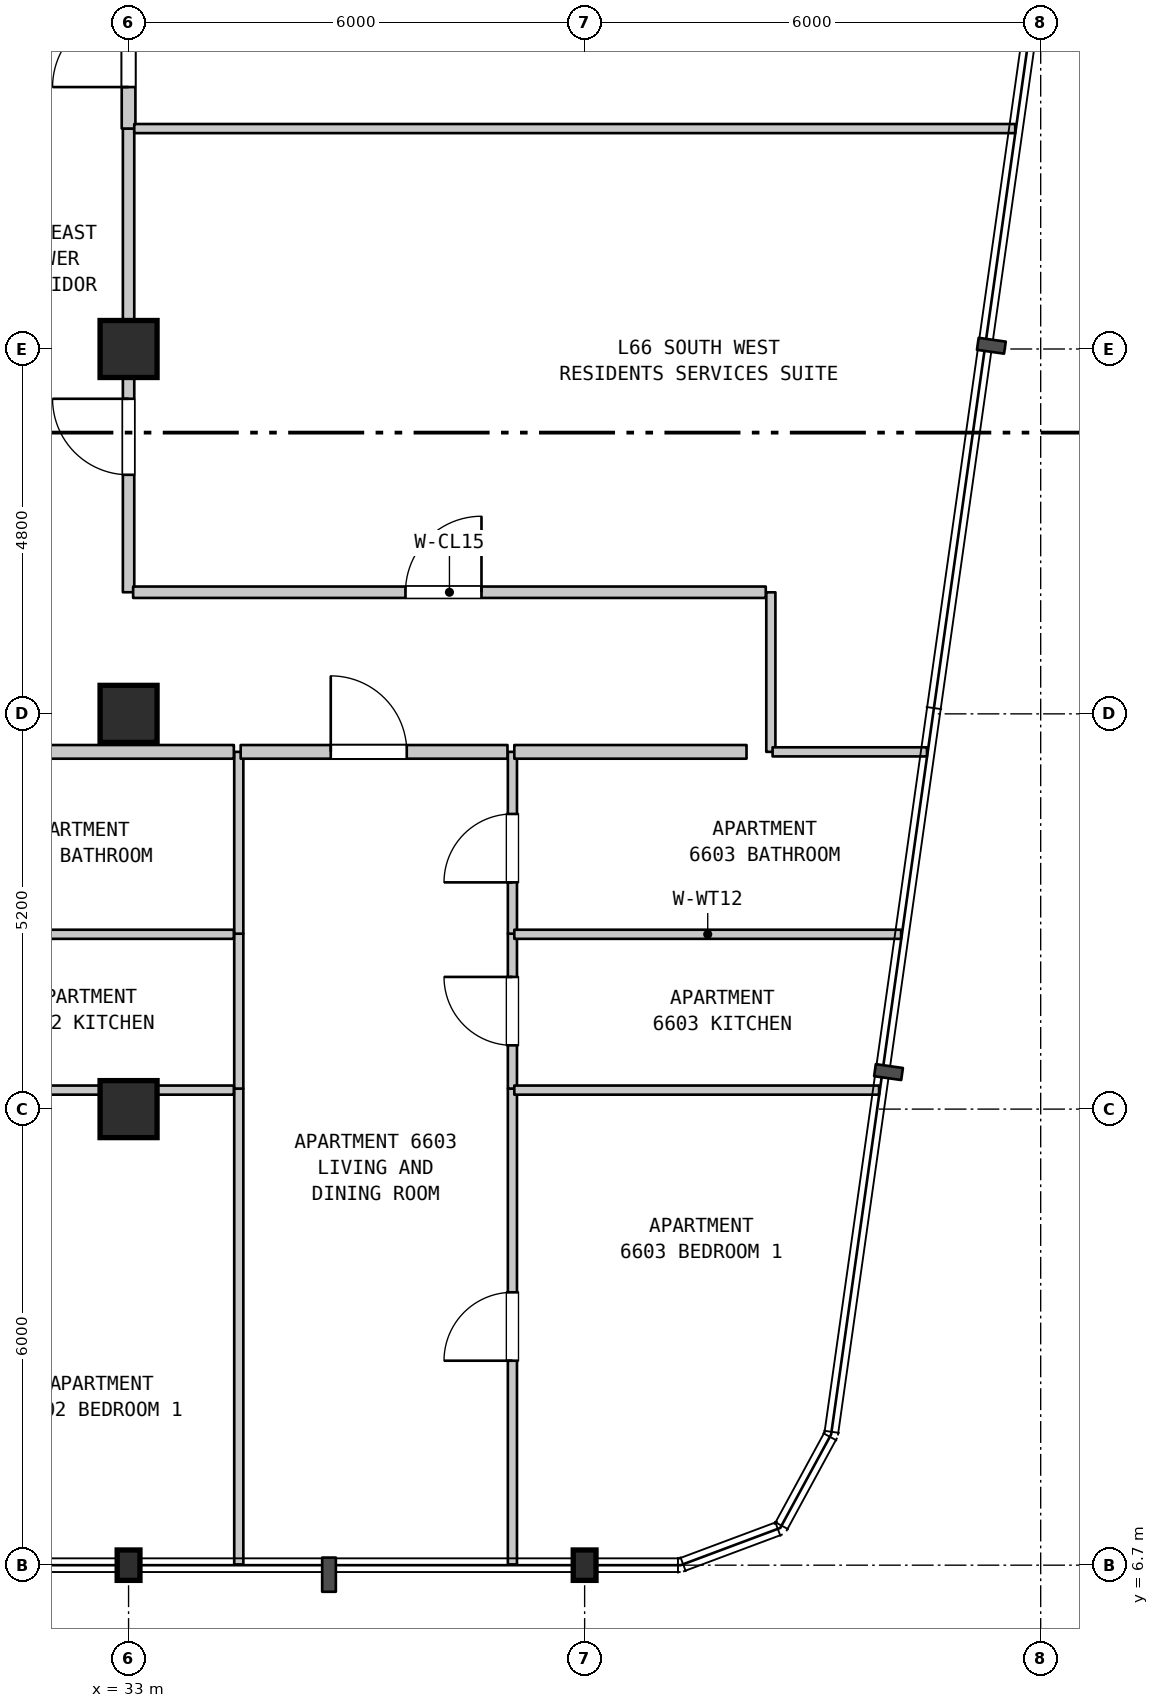
"""IFC4 building model, lengths in metres.
Left out: names, types, materials, properties, quantities, classifications, styles, units other than length and angle.
Written with IfcOpenShell. Run it as: python <this file> out.ifc"""

import sys

from ifc_helpers import new_model, si_unit, direction, frame, frame_2d, origin, origin_2d, place, context, subcontext, project, spatial, rectangle, i_section, extrude, element, fill, save


model = new_model("IFC4")
c1 = context("Model", 3, precision=1e-05, world=origin(), true_north=direction((0.0, 1.0)))
c2 = subcontext(c1, "Body", "Model", "MODEL_VIEW")
j1 = project(units=[si_unit("LENGTHUNIT", "METRE"), si_unit("PLANEANGLEUNIT", "RADIAN")], contexts=[c1])
p1 = place(None, origin())
s1 = spatial("IfcSite", under=j1, at=p1, CompositionType="ELEMENT")
p2 = place(p1, origin())
s2 = spatial("IfcBuilding", under=s1, at=p2, CompositionType="ELEMENT")
p3 = place(p2, frame((0.0, 0.0, 265.8)))
s3 = spatial("IfcBuildingStorey", under=s2, at=p3, CompositionType="ELEMENT", Elevation=265.8)
p4 = place(p3, frame((33.0, 6.7, 0.0), z_axis=(0.0, 0.0, 1.0), x_axis=(1.0, 0.0, 0.0)))
e1 = element("IfcColumn", 1, at=p4, inside=s3, PredefinedType="COLUMN", context=c2, shape_type="SweptSolid", body=[
    extrude(i_section(OverallWidth=0.3, OverallDepth=0.4, WebThickness=0.013, FlangeThickness=0.024, FilletRadius=0.027, at=origin_2d()), origin(), (0.0, 0.0, 1.0), 3.7),
])
for number, where, z_axis, x_axis in (
    (2, (33.0, 12.7, 0.0), (0.0, 0.0, 1.0), (1.0, 0.0, 0.0)),
    (3, (33.0, 17.9, 0.0), (0.0, 0.0, 1.0), (1.0, 0.0, 0.0)),
    (4, (33.0, 22.7, 0.0), (0.0, 0.0, 1.0), (1.0, 0.0, 0.0)),
):
    element("IfcColumn", number, at=place(p3, frame(where, z_axis=z_axis, x_axis=x_axis)), inside=s3, PredefinedType="COLUMN", context=c2, shape_type="SweptSolid", body=[
        extrude(rectangle(XDim=0.75, YDim=0.75, at=origin_2d()), origin(), (0.0, 0.0, 1.0), 3.7),
    ])
p5 = place(p3, frame((39.0, 6.7, 0.0), z_axis=(0.0, 0.0, 1.0), x_axis=(1.0, 0.0, 0.0)))
e5 = element("IfcColumn", 5, at=p5, inside=s3, PredefinedType="COLUMN", context=c2, shape_type="SweptSolid", body=[
    extrude(i_section(OverallWidth=0.3, OverallDepth=0.4, WebThickness=0.013, FlangeThickness=0.024, FilletRadius=0.027, at=origin_2d()), origin(), (0.0, 0.0, 1.0), 3.7),
])
p6 = place(p3, frame((33.0, 19.5, 0.0), z_axis=(0.0, 0.0, 1.0), x_axis=(0.0, 1.0, 0.0)))
e6 = element("IfcWall", 6, at=p6, inside=s3, PredefinedType="STANDARD", context=c2, shape_type="SweptSolid", body=[
    extrude(rectangle(XDim=6.1, YDim=0.15, at=frame_2d((3.05, 0.0))), origin(), (0.0, 0.0, 1.0), 3.1),
])
p7 = place(p6, frame((1.545, 0.0, 0.0)))
e7 = element("IfcOpeningElement", 7, at=p7, cuts=e6, PredefinedType="OPENING", context=c2, shape_type="SweptSolid", body=[
    extrude(rectangle(XDim=1.0, YDim=2.15, at=frame_2d((0.5, 1.075))), frame((0.0, 0.085, 0.0), z_axis=(0.0, -1.0, 0.0), x_axis=(1.0, 0.0, 0.0)), (0.0, 0.0, 1.0), 0.17),
])
p8 = place(p3, frame((33.0, 25.6, 0.0), z_axis=(0.0, 0.0, 1.0), x_axis=(0.0, 1.0, 0.0)))
e8 = element("IfcWall", 8, at=p8, inside=s3, PredefinedType="STANDARD", context=c2, shape_type="SweptSolid", body=[
    extrude(rectangle(XDim=2.3, YDim=0.18, at=frame_2d((1.15, 0.0))), origin(), (0.0, 0.0, 1.0), 3.1),
])
p9 = place(p8, frame((0.546, 0.0, 0.0)))
e9 = element("IfcOpeningElement", 9, at=p9, cuts=e8, PredefinedType="OPENING", context=c2, shape_type="SweptSolid", body=[
    extrude(rectangle(XDim=1.0, YDim=2.15, at=frame_2d((0.5, 1.075))), frame((0.0, 0.1, 0.0), z_axis=(0.0, -1.0, 0.0), x_axis=(1.0, 0.0, 0.0)), (0.0, 0.0, 1.0), 0.2),
])
p10 = place(p3, frame((34.45, 6.71, 0.0), z_axis=(0.0, 0.0, 1.0), x_axis=(0.0, 1.0, 0.0)))
e10 = element("IfcWall", 10, at=p10, inside=s3, PredefinedType="PARTITIONING", context=c2, shape_type="SweptSolid", body=[
    extrude(rectangle(XDim=6.26, YDim=0.12, at=frame_2d((3.13, 0.0))), origin(), (0.0, 0.0, 1.0), 3.39),
])
p11 = place(p3, frame((34.45, 12.97, 0.0), z_axis=(0.0, 0.0, 1.0), x_axis=(0.0, 1.0, 0.0)))
e11 = element("IfcWall", 11, at=p11, inside=s3, PredefinedType="PARTITIONING", context=c2, shape_type="SweptSolid", body=[
    extrude(rectangle(XDim=2.038, YDim=0.12, at=frame_2d((1.019, 0.0))), origin(), (0.0, 0.0, 1.0), 3.39),
])
p12 = place(p3, frame((34.45, 15.008, 0.0), z_axis=(0.0, 0.0, 1.0), x_axis=(0.0, 1.0, 0.0)))
e12 = element("IfcWall", 12, at=p12, inside=s3, PredefinedType="PARTITIONING", context=c2, shape_type="SweptSolid", body=[
    extrude(rectangle(XDim=2.392, YDim=0.12, at=frame_2d((1.196, 0.0))), origin(), (0.0, 0.0, 1.0), 3.39),
])
p13 = place(p3, frame((38.05, 6.71, 0.0), z_axis=(0.0, 0.0, 1.0), x_axis=(0.0, 1.0, 0.0)))
e13 = element("IfcWall", 13, at=p13, inside=s3, PredefinedType="PARTITIONING", context=c2, shape_type="SweptSolid", body=[
    extrude(rectangle(XDim=6.26, YDim=0.12, at=frame_2d((3.13, 0.0))), origin(), (0.0, 0.0, 1.0), 3.39),
])
p14 = place(p13, frame((2.68, 0.0, 0.0)))
e14 = element("IfcOpeningElement", 14, at=p14, cuts=e13, PredefinedType="OPENING", context=c2, shape_type="SweptSolid", body=[
    extrude(rectangle(XDim=0.9, YDim=2.15, at=frame_2d((0.45, 1.075))), frame((0.0, 0.07, 0.0), z_axis=(0.0, -1.0, 0.0), x_axis=(1.0, 0.0, 0.0)), (0.0, 0.0, 1.0), 0.14),
])
p15 = place(p3, frame((38.05, 12.97, 0.0), z_axis=(0.0, 0.0, 1.0), x_axis=(0.0, 1.0, 0.0)))
e15 = element("IfcWall", 15, at=p15, inside=s3, PredefinedType="PARTITIONING", context=c2, shape_type="SweptSolid", body=[
    extrude(rectangle(XDim=2.038, YDim=0.12, at=frame_2d((1.019, 0.0))), origin(), (0.0, 0.0, 1.0), 3.39),
])
p16 = place(p15, frame((0.569, 0.0, 0.0)))
e16 = element("IfcOpeningElement", 16, at=p16, cuts=e15, PredefinedType="OPENING", context=c2, shape_type="SweptSolid", body=[
    extrude(rectangle(XDim=0.9, YDim=2.15, at=frame_2d((0.45, 1.075))), frame((0.0, 0.07, 0.0), z_axis=(0.0, -1.0, 0.0), x_axis=(1.0, 0.0, 0.0)), (0.0, 0.0, 1.0), 0.14),
])
p17 = place(p3, frame((38.05, 15.008, 0.0), z_axis=(0.0, 0.0, 1.0), x_axis=(0.0, 1.0, 0.0)))
e17 = element("IfcWall", 17, at=p17, inside=s3, PredefinedType="PARTITIONING", context=c2, shape_type="SweptSolid", body=[
    extrude(rectangle(XDim=2.392, YDim=0.12, at=frame_2d((1.196, 0.0))), origin(), (0.0, 0.0, 1.0), 3.39),
])
p18 = place(p17, frame((0.675, 0.0, 0.0)))
e18 = element("IfcOpeningElement", 18, at=p18, cuts=e17, PredefinedType="OPENING", context=c2, shape_type="SweptSolid", body=[
    extrude(rectangle(XDim=0.9, YDim=2.1, at=frame_2d((0.45, 1.05))), frame((0.0, 0.07, 0.0), z_axis=(0.0, -1.0, 0.0), x_axis=(1.0, 0.0, 0.0)), (0.0, 0.0, 1.0), 0.14),
])
p19 = place(p3, frame((41.45, 17.4, 0.0), z_axis=(0.0, 0.0, 1.0), x_axis=(0.0, 1.0, 0.0)))
e19 = element("IfcWall", 19, at=p19, inside=s3, PredefinedType="PARTITIONING", context=c2, shape_type="SweptSolid", body=[
    extrude(rectangle(XDim=2.099, YDim=0.12, at=frame_2d((1.05, 0.0))), origin(), (0.0, 0.0, 1.0), 3.39),
])
p20 = place(p3, frame((29.845, 12.95, 0.0), z_axis=(0.0, 0.0, 1.0), x_axis=(1.0, 0.0, 0.0)))
e20 = element("IfcWall", 20, at=p20, inside=s3, PredefinedType="PARTITIONING", context=c2, shape_type="SweptSolid", body=[
    extrude(rectangle(XDim=4.54, YDim=0.12, at=frame_2d((2.27, 0.0))), origin(), (0.0, 0.0, 1.0), 3.39),
])
p21 = place(p3, frame((38.075, 12.95, 0.0), z_axis=(0.0, 0.0, 1.0), x_axis=(1.0, 0.0, 0.0)))
e21 = element("IfcWall", 21, at=p21, inside=s3, PredefinedType="PARTITIONING", context=c2, shape_type="SweptSolid", body=[
    extrude(rectangle(XDim=4.799, YDim=0.12, at=frame_2d((2.399, 0.0))), origin(), (0.0, 0.0, 1.0), 3.39),
])
p22 = place(p3, frame((29.845, 15.0, 0.0), z_axis=(0.0, 0.0, 1.0), x_axis=(1.0, 0.0, 0.0)))
e22 = element("IfcWall", 22, at=p22, inside=s3, PredefinedType="PARTITIONING", context=c2, shape_type="SweptSolid", body=[
    extrude(rectangle(XDim=4.54, YDim=0.12, at=frame_2d((2.27, 0.0))), origin(), (0.0, 0.0, 1.0), 3.39),
])
p23 = place(p3, frame((38.075, 15.0, 0.0), z_axis=(0.0, 0.0, 1.0), x_axis=(1.0, 0.0, 0.0)))
e23 = element("IfcWall", 23, at=p23, inside=s3, PredefinedType="PARTITIONING", context=c2, shape_type="SweptSolid", body=[
    extrude(rectangle(XDim=5.089, YDim=0.12, at=frame_2d((2.544, 0.0))), origin(), (0.0, 0.0, 1.0), 3.39),
])
p24 = place(p3, frame((29.845, 17.4, 0.0), z_axis=(0.0, 0.0, 1.0), x_axis=(1.0, 0.0, 0.0)))
e24 = element("IfcWall", 24, at=p24, inside=s3, PredefinedType="STANDARD", context=c2, shape_type="SweptSolid", body=[
    extrude(rectangle(XDim=4.54, YDim=0.18, at=frame_2d((2.27, 0.0))), origin(), (0.0, 0.0, 1.0), 3.39),
])
p25 = place(p3, frame((34.475, 17.4, 0.0), z_axis=(0.0, 0.0, 1.0), x_axis=(1.0, 0.0, 0.0)))
e25 = element("IfcWall", 25, at=p25, inside=s3, PredefinedType="STANDARD", context=c2, shape_type="SweptSolid", body=[
    extrude(rectangle(XDim=3.51, YDim=0.18, at=frame_2d((1.755, 0.0))), origin(), (0.0, 0.0, 1.0), 3.39),
])
p26 = place(p25, frame((1.185, 0.0, 0.0)))
e26 = element("IfcOpeningElement", 26, at=p26, cuts=e25, PredefinedType="OPENING", context=c2, shape_type="SweptSolid", body=[
    extrude(rectangle(XDim=1.0, YDim=2.15, at=frame_2d((0.5, 1.075))), frame((0.0, 0.1, 0.0), z_axis=(0.0, -1.0, 0.0), x_axis=(1.0, 0.0, 0.0)), (0.0, 0.0, 1.0), 0.2),
])
p27 = place(p3, frame((38.075, 17.4, 0.0), z_axis=(0.0, 0.0, 1.0), x_axis=(1.0, 0.0, 0.0)))
e27 = element("IfcWall", 27, at=p27, inside=s3, PredefinedType="STANDARD", context=c2, shape_type="SweptSolid", body=[
    extrude(rectangle(XDim=3.055, YDim=0.18, at=frame_2d((1.527, 0.0))), origin(), (0.0, 0.0, 1.0), 3.39),
])
p28 = place(p3, frame((41.473, 17.4, 0.0), z_axis=(0.0, 0.0, 1.0), x_axis=(1.0, 0.0, 0.0)))
e28 = element("IfcWall", 28, at=p28, inside=s3, PredefinedType="PARTITIONING", context=c2, shape_type="SweptSolid", body=[
    extrude(rectangle(XDim=2.031, YDim=0.12, at=frame_2d((1.016, 0.0))), origin(), (0.0, 0.0, 1.0), 3.39),
])
p29 = place(p3, frame((33.06, 19.5, 0.0), z_axis=(0.0, 0.0, 1.0), x_axis=(1.0, 0.0, 0.0)))
e29 = element("IfcWall", 29, at=p29, inside=s3, PredefinedType="STANDARD", context=c2, shape_type="SweptSolid", body=[
    extrude(rectangle(XDim=8.323, YDim=0.15, at=frame_2d((4.162, 0.0))), origin(), (0.0, 0.0, 1.0), 3.39),
])
p30 = place(p29, frame((3.583, 0.0, 0.0)))
e30 = element("IfcOpeningElement", 30, at=p30, cuts=e29, PredefinedType="OPENING", context=c2, shape_type="SweptSolid", body=[
    extrude(rectangle(XDim=1.0, YDim=2.15, at=frame_2d((0.5, 1.075))), frame((0.0, 0.085, 0.0), z_axis=(0.0, -1.0, 0.0), x_axis=(1.0, 0.0, 0.0)), (0.0, 0.0, 1.0), 0.17),
])
p31 = place(p3, frame((33.075, 25.6, 0.0), z_axis=(0.0, 0.0, 1.0), x_axis=(1.0, 0.0, 0.0)))
e31 = element("IfcWall", 31, at=p31, inside=s3, PredefinedType="PARTITIONING", context=c2, shape_type="SweptSolid", body=[
    extrude(rectangle(XDim=11.59, YDim=0.12, at=frame_2d((5.795, 0.0))), origin(), (0.0, 0.0, 1.0), 3.39),
])
p32 = place(p7, origin())
e32 = element("IfcDoor", 32, at=p32, inside=s3, OperationType="SINGLE_SWING_RIGHT", PredefinedType="DOOR", context=c2, shape_type="SweptSolid", body=[
    extrude(rectangle(XDim=1.0, YDim=2.15, at=frame_2d((0.5, 1.075))), frame((0.0, 0.025, 0.0), z_axis=(0.0, -1.0, 0.0), x_axis=(1.0, 0.0, 0.0)), (0.0, 0.0, 1.0), 0.05),
])
fill(e7, e32)
p33 = place(p9, origin())
e33 = element("IfcDoor", 33, at=p33, inside=s3, OperationType="SINGLE_SWING_LEFT", PredefinedType="DOOR", context=c2, shape_type="SweptSolid", body=[
    extrude(rectangle(XDim=1.0, YDim=2.15, at=frame_2d((0.5, 1.075))), frame((0.0, 0.025, 0.0), z_axis=(0.0, -1.0, 0.0), x_axis=(1.0, 0.0, 0.0)), (0.0, 0.0, 1.0), 0.05),
])
fill(e9, e33)
p34 = place(p14, origin())
e34 = element("IfcDoor", 34, at=p34, inside=s3, OperationType="SINGLE_SWING_LEFT", PredefinedType="DOOR", context=c2, shape_type="SweptSolid", body=[
    extrude(rectangle(XDim=0.9, YDim=2.15, at=frame_2d((0.45, 1.075))), frame((0.0, 0.025, 0.0), z_axis=(0.0, -1.0, 0.0), x_axis=(1.0, 0.0, 0.0)), (0.0, 0.0, 1.0), 0.05),
])
fill(e14, e34)
p35 = place(p16, origin())
e35 = element("IfcDoor", 35, at=p35, inside=s3, OperationType="SINGLE_SWING_RIGHT", PredefinedType="DOOR", context=c2, shape_type="SweptSolid", body=[
    extrude(rectangle(XDim=0.9, YDim=2.15, at=frame_2d((0.45, 1.075))), frame((0.0, 0.025, 0.0), z_axis=(0.0, -1.0, 0.0), x_axis=(1.0, 0.0, 0.0)), (0.0, 0.0, 1.0), 0.05),
])
fill(e16, e35)
p36 = place(p18, origin())
e36 = element("IfcDoor", 36, at=p36, inside=s3, OperationType="SINGLE_SWING_LEFT", PredefinedType="DOOR", context=c2, shape_type="SweptSolid", body=[
    extrude(rectangle(XDim=0.9, YDim=2.1, at=frame_2d((0.45, 1.05))), frame((0.0, 0.025, 0.0), z_axis=(0.0, -1.0, 0.0), x_axis=(1.0, 0.0, 0.0)), (0.0, 0.0, 1.0), 0.05),
])
fill(e18, e36)
p37 = place(p26, origin())
e37 = element("IfcDoor", 37, at=p37, inside=s3, OperationType="SINGLE_SWING_LEFT", PredefinedType="DOOR", context=c2, shape_type="SweptSolid", body=[
    extrude(rectangle(XDim=1.0, YDim=2.15, at=frame_2d((0.5, 1.075))), frame((0.0, 0.025, 0.0), z_axis=(0.0, -1.0, 0.0), x_axis=(1.0, 0.0, 0.0)), (0.0, 0.0, 1.0), 0.05),
])
fill(e26, e37)
p38 = place(p30, origin())
e38 = element("IfcDoor", 38, at=p38, inside=s3, OperationType="SINGLE_SWING_RIGHT", PredefinedType="DOOR", context=c2, shape_type="SweptSolid", body=[
    extrude(rectangle(XDim=1.0, YDim=2.15, at=frame_2d((0.5, 1.075))), frame((0.0, 0.025, 0.0), z_axis=(0.0, -1.0, 0.0), x_axis=(1.0, 0.0, 0.0)), (0.0, 0.0, 1.0), 0.05),
])
fill(e30, e38)
save(model, sys.argv[1])
